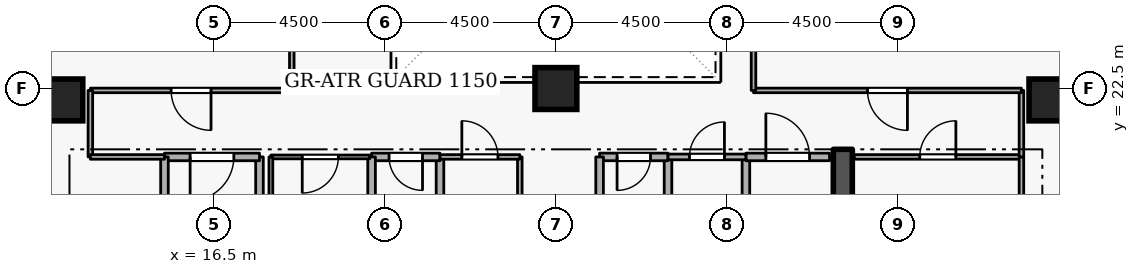
"""IFC4 building model, lengths in metres.
Left out: names, types, materials, properties, quantities, classifications, styles, units other than length and angle.
Written with IfcOpenShell. Run it as: python <this file> out.ifc"""

import sys

from ifc_helpers import new_model, si_unit, direction, frame, frame_2d, origin, origin_2d, place, context, subcontext, project, spatial, rectangle, extrude, element, fill, save


model = new_model("IFC4")
c1 = context("Model", 3, precision=1e-05, world=origin(), true_north=direction((0.0, 1.0)))
c2 = subcontext(c1, "Body", "Model", "MODEL_VIEW")
j1 = project(units=[si_unit("LENGTHUNIT", "METRE"), si_unit("PLANEANGLEUNIT", "RADIAN")], contexts=[c1])
p1 = place(None, origin())
s1 = spatial("IfcSite", under=j1, at=p1, CompositionType="ELEMENT")
p2 = place(p1, origin())
s2 = spatial("IfcBuilding", under=s1, at=p2, CompositionType="ELEMENT")
p3 = place(p2, frame((0.0, 0.0, 174.3)))
s3 = spatial("IfcBuildingStorey", under=s2, at=p3, CompositionType="ELEMENT", Elevation=174.3)
p4 = place(p3, frame((33.05, 15.1, 0.0), z_axis=(0.0, 0.0, 1.0), x_axis=(0.0, 1.0, 0.0)))
e1 = element("IfcWall", 1, at=p4, inside=s3, PredefinedType="SHEAR", context=c2, shape_type="SweptSolid", body=[
    extrude(rectangle(XDim=5.8, YDim=0.5, at=frame_2d((2.9, 0.0))), origin(), (0.0, 0.0, 1.0), 4.2),
])
for number, where, z_axis, x_axis in (
    (2, (12.5, 22.2, 0.0), (0.0, 0.0, 1.0), (1.0, 0.0, 0.0)),
    (3, (38.5, 22.2, 0.0), (0.0, 0.0, 1.0), (1.0, 0.0, 0.0)),
    (4, (25.5, 22.5, 0.0), (0.0, 0.0, 1.0), (1.0, 0.0, 0.0)),
):
    element("IfcColumn", number, at=place(p3, frame(where, z_axis=z_axis, x_axis=x_axis)), inside=s3, PredefinedType="COLUMN", context=c2, shape_type="SweptSolid", body=[
        extrude(rectangle(XDim=1.1, YDim=1.1, at=origin_2d()), origin(), (0.0, 0.0, 1.0), 4.2),
    ])
p5 = place(p3, frame((17.7, 18.4, 0.0), z_axis=(0.0, 0.0, 1.0), x_axis=(0.0, 1.0, 0.0)))
e5 = element("IfcWall", 5, at=p5, inside=s3, PredefinedType="STANDARD", context=c2, shape_type="SweptSolid", body=[
    extrude(rectangle(XDim=2.3, YDim=0.2, at=frame_2d((1.15, 0.0))), origin(), (0.0, 0.0, 1.0), 3.145),
])
p6 = place(p3, frame((17.7, 20.7, 0.0), z_axis=(0.0, 0.0, 1.0), x_axis=(-1.0, 0.0, 0.0)))
e6 = element("IfcWall", 6, at=p6, inside=s3, PredefinedType="STANDARD", context=c2, shape_type="SweptSolid", body=[
    extrude(rectangle(XDim=2.5, YDim=0.2, at=frame_2d((1.25, 0.0))), origin(), (0.0, 0.0, 1.0), 3.94),
])
p7 = place(p6, frame((0.675, 0.0, 0.0)))
e7 = element("IfcOpeningElement", 7, at=p7, cuts=e6, PredefinedType="OPENING", context=c2, shape_type="SweptSolid", body=[
    extrude(rectangle(XDim=1.15, YDim=2.1, at=frame_2d((0.575, 1.05))), frame((0.0, 0.11, 0.0), z_axis=(0.0, -1.0, 0.0), x_axis=(1.0, 0.0, 0.0)), (0.0, 0.0, 1.0), 0.22),
])
p8 = place(p3, frame((15.2, 20.7, 0.0), z_axis=(0.0, 0.0, 1.0), x_axis=(0.0, -1.0, 0.0)))
e8 = element("IfcWall", 8, at=p8, inside=s3, PredefinedType="STANDARD", context=c2, shape_type="SweptSolid", body=[
    extrude(rectangle(XDim=5.7, YDim=0.2, at=frame_2d((2.85, 0.0))), origin(), (0.0, 0.0, 1.0), 3.94),
])
p9 = place(p3, frame((28.45, 18.65, 0.0), z_axis=(0.0, 0.0, 1.0), x_axis=(0.0, 1.0, 0.0)))
e9 = element("IfcWall", 9, at=p9, inside=s3, PredefinedType="STANDARD", context=c2, shape_type="SweptSolid", body=[
    extrude(rectangle(XDim=2.05, YDim=0.2, at=frame_2d((1.025, 0.0))), origin(), (0.0, 0.0, 1.0), 3.94),
])
p10 = place(p3, frame((28.45, 20.7, 0.0), z_axis=(0.0, 0.0, 1.0), x_axis=(-1.0, 0.0, 0.0)))
e10 = element("IfcWall", 10, at=p10, inside=s3, PredefinedType="STANDARD", context=c2, shape_type="SweptSolid", body=[
    extrude(rectangle(XDim=1.8, YDim=0.2, at=frame_2d((0.9, 0.0))), origin(), (0.0, 0.0, 1.0), 3.94),
])
p11 = place(p10, frame((0.46, 0.0, 0.0)))
e11 = element("IfcOpeningElement", 11, at=p11, cuts=e10, PredefinedType="OPENING", context=c2, shape_type="SweptSolid", body=[
    extrude(rectangle(XDim=0.88, YDim=2.04, at=frame_2d((0.44, 1.02))), frame((0.0, 0.11, 0.0), z_axis=(0.0, -1.0, 0.0), x_axis=(1.0, 0.0, 0.0)), (0.0, 0.0, 1.0), 0.22),
])
for number, where, z_axis, x_axis in (
    (12, (26.65, 20.7, 0.0), (0.0, 0.0, 1.0), (0.0, -1.0, 0.0)),
    (13, (22.45, 18.65, 0.0), (0.0, 0.0, 1.0), (0.0, 1.0, 0.0)),
):
    element("IfcWall", number, at=place(p3, frame(where, z_axis=z_axis, x_axis=x_axis)), inside=s3, PredefinedType="STANDARD", context=c2, shape_type="SweptSolid", body=[
        extrude(rectangle(XDim=2.05, YDim=0.2, at=frame_2d((1.025, 0.0))), origin(), (0.0, 0.0, 1.0), 3.94),
    ])
p12 = place(p3, frame((22.45, 20.7, 0.0), z_axis=(0.0, 0.0, 1.0), x_axis=(-1.0, 0.0, 0.0)))
e14 = element("IfcWall", 14, at=p12, inside=s3, PredefinedType="STANDARD", context=c2, shape_type="SweptSolid", body=[
    extrude(rectangle(XDim=1.8, YDim=0.2, at=frame_2d((0.9, 0.0))), origin(), (0.0, 0.0, 1.0), 3.94),
])
p13 = place(p12, frame((0.46, 0.0, 0.0)))
e15 = element("IfcOpeningElement", 15, at=p13, cuts=e14, PredefinedType="OPENING", context=c2, shape_type="SweptSolid", body=[
    extrude(rectangle(XDim=0.88, YDim=2.04, at=frame_2d((0.44, 1.02))), frame((0.0, 0.11, 0.0), z_axis=(0.0, -1.0, 0.0), x_axis=(1.0, 0.0, 0.0)), (0.0, 0.0, 1.0), 0.22),
])
for number, where, z_axis, x_axis in (
    (16, (20.65, 20.7, 0.0), (0.0, 0.0, 1.0), (0.0, -1.0, 0.0)),
    (17, (30.5, 18.65, 0.0), (0.0, 0.0, 1.0), (0.0, 1.0, 0.0)),
):
    element("IfcWall", number, at=place(p3, frame(where, z_axis=z_axis, x_axis=x_axis)), inside=s3, PredefinedType="STANDARD", context=c2, shape_type="SweptSolid", body=[
        extrude(rectangle(XDim=2.05, YDim=0.2, at=frame_2d((1.025, 0.0))), origin(), (0.0, 0.0, 1.0), 3.94),
    ])
p14 = place(p3, frame((30.5, 20.7, 0.0), z_axis=(0.0, 0.0, 1.0), x_axis=(1.0, 0.0, 0.0)))
e18 = element("IfcWall", 18, at=p14, inside=s3, PredefinedType="STANDARD", context=c2, shape_type="SweptSolid", body=[
    extrude(rectangle(XDim=2.2, YDim=0.2, at=frame_2d((1.1, 0.0))), origin(), (0.0, 0.0, 1.0), 3.94),
])
p15 = place(p14, frame((0.525, 0.0, 0.0)))
e19 = element("IfcOpeningElement", 19, at=p15, cuts=e18, PredefinedType="OPENING", context=c2, shape_type="SweptSolid", body=[
    extrude(rectangle(XDim=1.15, YDim=2.1, at=frame_2d((0.575, 1.05))), frame((0.0, 0.11, 0.0), z_axis=(0.0, -1.0, 0.0), x_axis=(1.0, 0.0, 0.0)), (0.0, 0.0, 1.0), 0.22),
])
p16 = place(p3, frame((20.6, 20.7, 0.0), z_axis=(0.0, 0.0, 1.0), x_axis=(-1.0, 0.0, 0.0)))
e20 = element("IfcWall", 20, at=p16, inside=s3, PredefinedType="PARTITIONING", context=c2, shape_type="SweptSolid", body=[
    extrude(rectangle(XDim=2.6, YDim=0.1, at=frame_2d((1.3, 0.0))), origin(), (0.0, 0.0, 1.0), 3.94),
])
p17 = place(p16, frame((0.825, 0.0, 0.0)))
e21 = element("IfcOpeningElement", 21, at=p17, cuts=e20, PredefinedType="OPENING", context=c2, shape_type="SweptSolid", body=[
    extrude(rectangle(XDim=0.95, YDim=2.1, at=frame_2d((0.475, 1.05))), frame((0.0, 0.06, 0.0), z_axis=(0.0, -1.0, 0.0), x_axis=(1.0, 0.0, 0.0)), (0.0, 0.0, 1.0), 0.12),
])
p18 = place(p3, frame((18.0, 20.7, 0.0), z_axis=(0.0, 0.0, 1.0), x_axis=(0.0, -1.0, 0.0)))
e22 = element("IfcWall", 22, at=p18, inside=s3, PredefinedType="PARTITIONING", context=c2, shape_type="SweptSolid", body=[
    extrude(rectangle(XDim=2.05, YDim=0.1, at=frame_2d((1.025, 0.0))), origin(), (0.0, 0.0, 1.0), 3.145),
])
p19 = place(p3, frame((24.55, 20.7, 0.0), z_axis=(0.0, 0.0, 1.0), x_axis=(0.0, -1.0, 0.0)))
e23 = element("IfcWall", 23, at=p19, inside=s3, PredefinedType="PARTITIONING", context=c2, shape_type="SweptSolid", body=[
    extrude(rectangle(XDim=2.05, YDim=0.12, at=frame_2d((1.025, 0.0))), origin(), (0.0, 0.0, 1.0), 3.94),
])
p20 = place(p3, frame((22.45, 20.7, 0.0), z_axis=(0.0, 0.0, 1.0), x_axis=(1.0, 0.0, 0.0)))
e24 = element("IfcWall", 24, at=p20, inside=s3, PredefinedType="PARTITIONING", context=c2, shape_type="SweptSolid", body=[
    extrude(rectangle(XDim=2.1, YDim=0.12, at=frame_2d((1.05, 0.0))), origin(), (0.0, 0.0, 1.0), 3.94),
])
p21 = place(p20, frame((0.575, 0.0, 0.0)))
e25 = element("IfcOpeningElement", 25, at=p21, cuts=e24, PredefinedType="OPENING", context=c2, shape_type="SweptSolid", body=[
    extrude(rectangle(XDim=0.95, YDim=2.1, at=frame_2d((0.475, 1.05))), frame((0.0, 0.07, 0.0), z_axis=(0.0, -1.0, 0.0), x_axis=(1.0, 0.0, 0.0)), (0.0, 0.0, 1.0), 0.14),
])
p22 = place(p3, frame((28.45, 20.7, 0.0), z_axis=(0.0, 0.0, 1.0), x_axis=(1.0, 0.0, 0.0)))
e26 = element("IfcWall", 26, at=p22, inside=s3, PredefinedType="PARTITIONING", context=c2, shape_type="SweptSolid", body=[
    extrude(rectangle(XDim=2.05, YDim=0.15, at=frame_2d((1.025, 0.0))), origin(), (0.0, 0.0, 1.0), 3.94),
])
p23 = place(p22, frame((0.565, 0.0, 0.0)))
e27 = element("IfcOpeningElement", 27, at=p23, cuts=e26, PredefinedType="OPENING", context=c2, shape_type="SweptSolid", body=[
    extrude(rectangle(XDim=0.92, YDim=2.08, at=frame_2d((0.46, 1.04))), frame((0.0, 0.085, 0.0), z_axis=(0.0, -1.0, 0.0), x_axis=(1.0, 0.0, 0.0)), (0.0, 0.0, 1.0), 0.17),
])
p24 = place(p3, frame((33.35, 20.7, 0.0), z_axis=(0.0, 0.0, 1.0), x_axis=(1.0, 0.0, 0.0)))
e28 = element("IfcWall", 28, at=p24, inside=s3, PredefinedType="PARTITIONING", context=c2, shape_type="SweptSolid", body=[
    extrude(rectangle(XDim=4.4, YDim=0.12, at=frame_2d((2.2, 0.0))), origin(), (0.0, 0.0, 1.0), 3.94),
])
p25 = place(p24, frame((1.725, 0.0, 0.0)))
e29 = element("IfcOpeningElement", 29, at=p25, cuts=e28, PredefinedType="OPENING", context=c2, shape_type="SweptSolid", body=[
    extrude(rectangle(XDim=0.95, YDim=2.1, at=frame_2d((0.475, 1.05))), frame((0.0, 0.07, 0.0), z_axis=(0.0, -1.0, 0.0), x_axis=(1.0, 0.0, 0.0)), (0.0, 0.0, 1.0), 0.14),
])
p26 = place(p3, frame((37.75, 20.7, 0.0), z_axis=(0.0, 0.0, 1.0), x_axis=(0.0, -1.0, 0.0)))
e30 = element("IfcWall", 30, at=p26, inside=s3, PredefinedType="PARTITIONING", context=c2, shape_type="SweptSolid", body=[
    extrude(rectangle(XDim=5.65, YDim=0.12, at=frame_2d((2.825, 0.0))), origin(), (0.0, 0.0, 1.0), 3.94),
])
p27 = place(p3, frame((18.55, 27.0, 0.0), z_axis=(0.0, 0.0, 1.0), x_axis=(0.0, -1.0, 0.0)))
e31 = element("IfcWall", 31, at=p27, inside=s3, PredefinedType="PARTITIONING", context=c2, shape_type="SweptSolid", body=[
    extrude(rectangle(XDim=4.55, YDim=0.12, at=frame_2d((2.275, 0.0))), origin(), (0.0, 0.0, 1.0), 3.94),
])
p28 = place(p3, frame((18.55, 22.45, 0.0), z_axis=(0.0, 0.0, 1.0), x_axis=(-1.0, 0.0, 0.0)))
e32 = element("IfcWall", 32, at=p28, inside=s3, PredefinedType="PARTITIONING", context=c2, shape_type="SweptSolid", body=[
    extrude(rectangle(XDim=5.3, YDim=0.12, at=frame_2d((2.65, 0.0))), origin(), (0.0, 0.0, 1.0), 3.94),
])
p29 = place(p28, frame((2.125, 0.0, 0.0)))
e33 = element("IfcOpeningElement", 33, at=p29, cuts=e32, PredefinedType="OPENING", context=c2, shape_type="SweptSolid", body=[
    extrude(rectangle(XDim=1.05, YDim=2.1, at=frame_2d((0.525, 1.05))), frame((0.0, 0.07, 0.0), z_axis=(0.0, -1.0, 0.0), x_axis=(1.0, 0.0, 0.0)), (0.0, 0.0, 1.0), 0.14),
])
p30 = place(p3, frame((13.25, 22.45, 0.0), z_axis=(0.0, 0.0, 1.0), x_axis=(0.0, -1.0, 0.0)))
e34 = element("IfcWall", 34, at=p30, inside=s3, PredefinedType="PARTITIONING", context=c2, shape_type="SweptSolid", body=[
    extrude(rectangle(XDim=1.75, YDim=0.12, at=frame_2d((0.875, 0.0))), origin(), (0.0, 0.0, 1.0), 3.94),
])
p31 = place(p3, frame((13.25, 20.7, 0.0), z_axis=(0.0, 0.0, 1.0), x_axis=(1.0, 0.0, 0.0)))
e35 = element("IfcWall", 35, at=p31, inside=s3, PredefinedType="PARTITIONING", context=c2, shape_type="SweptSolid", body=[
    extrude(rectangle(XDim=1.95, YDim=0.12, at=frame_2d((0.975, 0.0))), origin(), (0.0, 0.0, 1.0), 3.94),
])
p32 = place(p3, frame((37.75, 20.7, 0.0), z_axis=(0.0, 0.0, 1.0), x_axis=(0.0, 1.0, 0.0)))
e36 = element("IfcWall", 36, at=p32, inside=s3, PredefinedType="PARTITIONING", context=c2, shape_type="SweptSolid", body=[
    extrude(rectangle(XDim=1.75, YDim=0.12, at=frame_2d((0.875, 0.0))), origin(), (0.0, 0.0, 1.0), 3.94),
])
p33 = place(p3, frame((37.75, 22.45, 0.0), z_axis=(0.0, 0.0, 1.0), x_axis=(-1.0, 0.0, 0.0)))
e37 = element("IfcWall", 37, at=p33, inside=s3, PredefinedType="PARTITIONING", context=c2, shape_type="SweptSolid", body=[
    extrude(rectangle(XDim=7.05, YDim=0.12, at=frame_2d((3.525, 0.0))), origin(), (0.0, 0.0, 1.0), 3.94),
])
p34 = place(p33, frame((3.0, 0.0, 0.0)))
e38 = element("IfcOpeningElement", 38, at=p34, cuts=e37, PredefinedType="OPENING", context=c2, shape_type="SweptSolid", body=[
    extrude(rectangle(XDim=1.05, YDim=2.1, at=frame_2d((0.525, 1.05))), frame((0.0, 0.07, 0.0), z_axis=(0.0, -1.0, 0.0), x_axis=(1.0, 0.0, 0.0)), (0.0, 0.0, 1.0), 0.14),
])
p35 = place(p3, frame((30.7, 22.45, 0.0), z_axis=(0.0, 0.0, 1.0), x_axis=(0.0, 1.0, 0.0)))
e39 = element("IfcWall", 39, at=p35, inside=s3, PredefinedType="PARTITIONING", context=c2, shape_type="SweptSolid", body=[
    extrude(rectangle(XDim=4.55, YDim=0.12, at=frame_2d((2.275, 0.0))), origin(), (0.0, 0.0, 1.0), 3.94),
])
p36 = place(p7, origin())
e40 = element("IfcDoor", 40, at=p36, inside=s3, OperationType="SINGLE_SWING_RIGHT", PredefinedType="DOOR", context=c2, shape_type="SweptSolid", body=[
    extrude(rectangle(XDim=1.15, YDim=2.1, at=frame_2d((0.575, 1.05))), frame((0.0, 0.025, 0.0), z_axis=(0.0, -1.0, 0.0), x_axis=(1.0, 0.0, 0.0)), (0.0, 0.0, 1.0), 0.05),
])
fill(e7, e40)
p37 = place(p11, origin())
e41 = element("IfcDoor", 41, at=p37, inside=s3, OperationType="SINGLE_SWING_RIGHT", PredefinedType="DOOR", context=c2, shape_type="SweptSolid", body=[
    extrude(rectangle(XDim=0.88, YDim=2.04, at=frame_2d((0.44, 1.02))), frame((0.0, 0.025, 0.0), z_axis=(0.0, -1.0, 0.0), x_axis=(1.0, 0.0, 0.0)), (0.0, 0.0, 1.0), 0.05),
])
fill(e11, e41)
p38 = place(p13, origin())
e42 = element("IfcDoor", 42, at=p38, inside=s3, OperationType="SINGLE_SWING_LEFT", PredefinedType="DOOR", context=c2, shape_type="SweptSolid", body=[
    extrude(rectangle(XDim=0.88, YDim=2.04, at=frame_2d((0.44, 1.02))), frame((0.0, 0.025, 0.0), z_axis=(0.0, -1.0, 0.0), x_axis=(1.0, 0.0, 0.0)), (0.0, 0.0, 1.0), 0.05),
])
fill(e15, e42)
p39 = place(p17, origin())
e43 = element("IfcDoor", 43, at=p39, inside=s3, OperationType="SINGLE_SWING_RIGHT", PredefinedType="DOOR", context=c2, shape_type="SweptSolid", body=[
    extrude(rectangle(XDim=0.95, YDim=2.1, at=frame_2d((0.475, 1.05))), frame((0.0, 0.025, 0.0), z_axis=(0.0, -1.0, 0.0), x_axis=(1.0, 0.0, 0.0)), (0.0, 0.0, 1.0), 0.05),
])
fill(e21, e43)
p40 = place(p21, origin())
e44 = element("IfcDoor", 44, at=p40, inside=s3, OperationType="SINGLE_SWING_LEFT", PredefinedType="DOOR", context=c2, shape_type="SweptSolid", body=[
    extrude(rectangle(XDim=0.95, YDim=2.1, at=frame_2d((0.475, 1.05))), frame((0.0, 0.025, 0.0), z_axis=(0.0, -1.0, 0.0), x_axis=(1.0, 0.0, 0.0)), (0.0, 0.0, 1.0), 0.05),
])
fill(e25, e44)
p41 = place(p23, origin())
e45 = element("IfcDoor", 45, at=p41, inside=s3, OperationType="SINGLE_SWING_RIGHT", PredefinedType="DOOR", context=c2, shape_type="SweptSolid", body=[
    extrude(rectangle(XDim=0.92, YDim=2.08, at=frame_2d((0.46, 1.04))), frame((0.0, 0.025, 0.0), z_axis=(0.0, -1.0, 0.0), x_axis=(1.0, 0.0, 0.0)), (0.0, 0.0, 1.0), 0.05),
])
fill(e27, e45)
p42 = place(p15, origin())
e46 = element("IfcDoor", 46, at=p42, inside=s3, OperationType="SINGLE_SWING_LEFT", PredefinedType="DOOR", context=c2, shape_type="SweptSolid", body=[
    extrude(rectangle(XDim=1.15, YDim=2.1, at=frame_2d((0.575, 1.05))), frame((0.0, 0.025, 0.0), z_axis=(0.0, -1.0, 0.0), x_axis=(1.0, 0.0, 0.0)), (0.0, 0.0, 1.0), 0.05),
])
fill(e19, e46)
p43 = place(p25, origin())
e47 = element("IfcDoor", 47, at=p43, inside=s3, OperationType="SINGLE_SWING_RIGHT", PredefinedType="DOOR", context=c2, shape_type="SweptSolid", body=[
    extrude(rectangle(XDim=0.95, YDim=2.1, at=frame_2d((0.475, 1.05))), frame((0.0, 0.025, 0.0), z_axis=(0.0, -1.0, 0.0), x_axis=(1.0, 0.0, 0.0)), (0.0, 0.0, 1.0), 0.05),
])
fill(e29, e47)
p44 = place(p29, origin())
e48 = element("IfcDoor", 48, at=p44, inside=s3, OperationType="SINGLE_SWING_LEFT", PredefinedType="DOOR", context=c2, shape_type="SweptSolid", body=[
    extrude(rectangle(XDim=1.05, YDim=2.1, at=frame_2d((0.525, 1.05))), frame((0.0, 0.025, 0.0), z_axis=(0.0, -1.0, 0.0), x_axis=(1.0, 0.0, 0.0)), (0.0, 0.0, 1.0), 0.05),
])
fill(e33, e48)
p45 = place(p34, origin())
e49 = element("IfcDoor", 49, at=p45, inside=s3, OperationType="SINGLE_SWING_LEFT", PredefinedType="DOOR", context=c2, shape_type="SweptSolid", body=[
    extrude(rectangle(XDim=1.05, YDim=2.1, at=frame_2d((0.525, 1.05))), frame((0.0, 0.025, 0.0), z_axis=(0.0, -1.0, 0.0), x_axis=(1.0, 0.0, 0.0)), (0.0, 0.0, 1.0), 0.05),
])
fill(e38, e49)
save(model, sys.argv[1])
